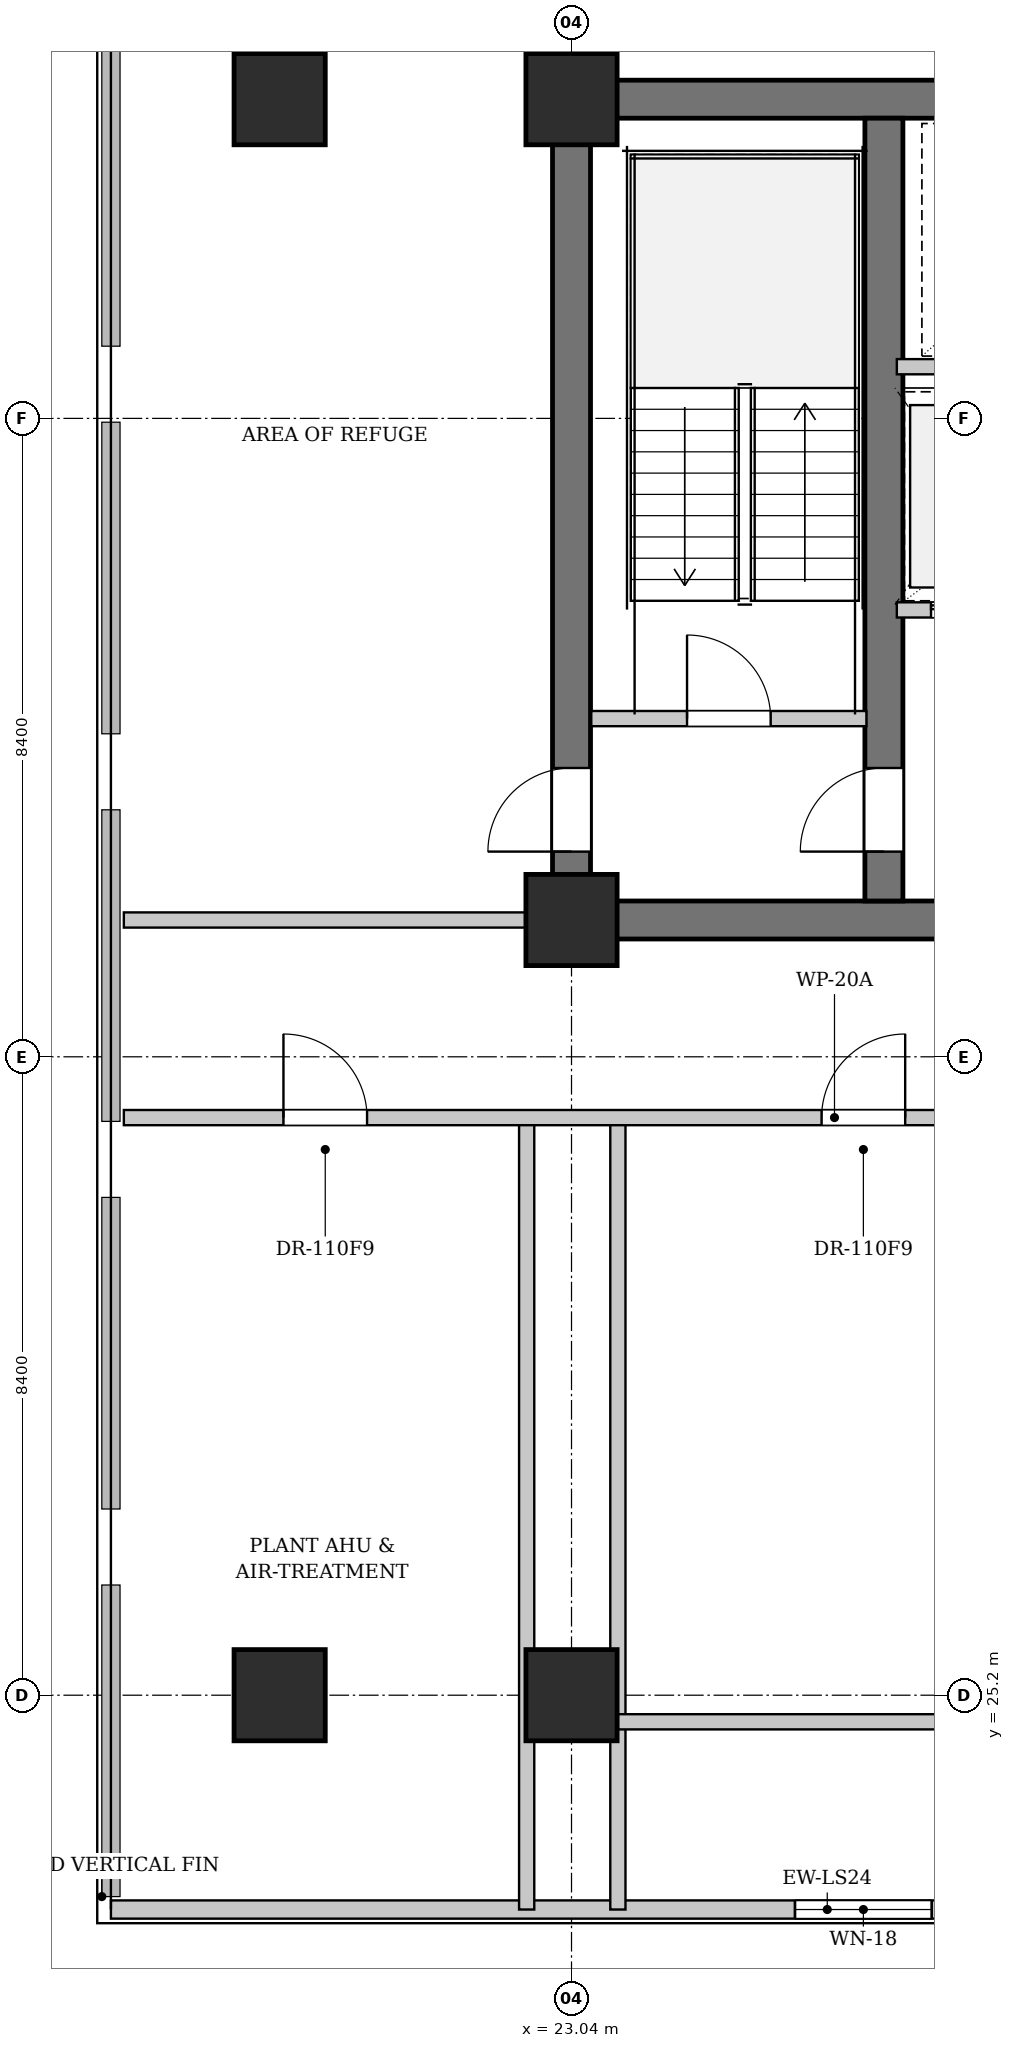
"""IFC4 building model, lengths in metres.
Left out: names, types, materials, properties, quantities, classifications, styles, units other than length and angle.
Written with IfcOpenShell. Run it as: python <this file> out.ifc"""

import sys

from ifc_helpers import new_model, si_unit, direction, frame, frame_2d, origin, origin_2d, place, context, subcontext, project, spatial, rectangle, extrude, element, fill, save


model = new_model("IFC4")
c1 = context("Model", 3, precision=1e-05, world=origin(), true_north=direction((0.0, 1.0)))
c2 = subcontext(c1, "Body", "Model", "MODEL_VIEW")
j1 = project(units=[si_unit("LENGTHUNIT", "METRE"), si_unit("PLANEANGLEUNIT", "RADIAN")], contexts=[c1])
p1 = place(None, origin())
s1 = spatial("IfcSite", under=j1, at=p1, CompositionType="ELEMENT")
p2 = place(p1, origin())
s2 = spatial("IfcBuilding", under=s1, at=p2, CompositionType="ELEMENT")
p3 = place(p2, frame((0.0, 0.0, 78.0)))
s3 = spatial("IfcBuildingStorey", under=s2, at=p3, CompositionType="ELEMENT", Elevation=78.0)
p4 = place(p3, frame((22.79, 46.2, 0.0), z_axis=(0.0, 0.0, 1.0), x_axis=(1.0, 0.0, 0.0)))
e1 = element("IfcWall", 1, at=p4, inside=s3, PredefinedType="SHEAR", context=c2, shape_type="SweptSolid", body=[
    extrude(rectangle(XDim=31.22, YDim=0.5, at=frame_2d((15.61, 0.0))), origin(), (0.0, 0.0, 1.0), 3.68),
])
p5 = place(p3, frame((22.79, 35.4, 0.0), z_axis=(0.0, 0.0, 1.0), x_axis=(1.0, 0.0, 0.0)))
e2 = element("IfcWall", 2, at=p5, inside=s3, PredefinedType="SHEAR", context=c2, shape_type="SweptSolid", body=[
    extrude(rectangle(XDim=5.41, YDim=0.5, at=frame_2d((2.705, 0.0))), origin(), (0.0, 0.0, 1.0), 3.68),
])
p6 = place(p3, frame((23.04, 35.65, 0.0), z_axis=(0.0, 0.0, 1.0), x_axis=(0.0, 1.0, 0.0)))
e3 = element("IfcWall", 3, at=p6, inside=s3, PredefinedType="SHEAR", context=c2, shape_type="SweptSolid", body=[
    extrude(rectangle(XDim=10.3, YDim=0.5, at=frame_2d((5.15, 0.0))), origin(), (0.0, 0.0, 1.0), 3.68),
])
p7 = place(p6, frame((0.65, 0.0, 0.0)))
e4 = element("IfcOpeningElement", 4, at=p7, cuts=e3, PredefinedType="OPENING", context=c2, shape_type="SweptSolid", body=[
    extrude(rectangle(XDim=1.1, YDim=2.15, at=frame_2d((0.55, 1.075))), frame((0.0, 0.26, 0.0), z_axis=(0.0, -1.0, 0.0), x_axis=(1.0, 0.0, 0.0)), (0.0, 0.0, 1.0), 0.52),
])
p8 = place(p3, frame((27.15, 35.65, 0.0), z_axis=(0.0, 0.0, 1.0), x_axis=(0.0, 1.0, 0.0)))
e5 = element("IfcWall", 5, at=p8, inside=s3, PredefinedType="SHEAR", context=c2, shape_type="SweptSolid", body=[
    extrude(rectangle(XDim=10.3, YDim=0.5, at=frame_2d((5.15, 0.0))), origin(), (0.0, 0.0, 1.0), 3.68),
])
p9 = place(p8, frame((0.65, 0.0, 0.0)))
e6 = element("IfcOpeningElement", 6, at=p9, cuts=e5, PredefinedType="OPENING", context=c2, shape_type="SweptSolid", body=[
    extrude(rectangle(XDim=1.1, YDim=2.15, at=frame_2d((0.55, 1.075))), frame((0.0, 0.26, 0.0), z_axis=(0.0, -1.0, 0.0), x_axis=(1.0, 0.0, 0.0)), (0.0, 0.0, 1.0), 0.52),
])
for number, where, z_axis, x_axis in (
    (7, (23.04, 35.4, 0.0), (0.0, 0.0, 1.0), (1.0, 0.0, 0.0)),
    (8, (23.04, 46.2, 0.0), (0.0, 0.0, 1.0), (1.0, 0.0, 0.0)),
    (9, (23.04, 25.2, 0.0), (0.0, 0.0, 1.0), (1.0, 0.0, 0.0)),
    (10, (19.2, 25.2, 0.0), (0.0, 0.0, 1.0), (1.0, 0.0, 0.0)),
    (11, (19.2, 46.2, 0.0), (0.0, 0.0, 1.0), (1.0, 0.0, 0.0)),
):
    element("IfcColumn", number, at=place(p3, frame(where, z_axis=z_axis, x_axis=x_axis)), inside=s3, PredefinedType="COLUMN", context=c2, shape_type="SweptSolid", body=[
        extrude(rectangle(XDim=1.2, YDim=1.2, at=origin_2d()), origin(), (0.0, 0.0, 1.0), 3.9),
    ])
p10 = place(p3, frame((16.98, 22.38, 0.0), z_axis=(0.0, 0.0, 1.0), x_axis=(1.0, 0.0, 0.0)))
e12 = element("IfcWall", 12, at=p10, inside=s3, PredefinedType="SOLIDWALL", context=c2, shape_type="SweptSolid", body=[
    extrude(rectangle(XDim=42.84, YDim=0.24, at=frame_2d((21.42, 0.0))), origin(), (0.0, 0.0, 1.0), 3.68),
])
p11 = place(p10, frame((16.78, 0.0, 0.0)))
e13 = element("IfcOpeningElement", 13, at=p11, cuts=e12, PredefinedType="OPENING", context=c2, shape_type="SweptSolid", body=[
    extrude(rectangle(XDim=1.6, YDim=2.25, at=frame_2d((0.8, 1.125))), frame((0.0, 0.13, 0.0), z_axis=(0.0, -1.0, 0.0), x_axis=(1.0, 0.0, 0.0)), (0.0, 0.0, 1.0), 0.26),
])
p12 = place(p10, frame((9.0, 0.0, 0.9)))
e14 = element("IfcOpeningElement", 14, at=p12, cuts=e12, PredefinedType="OPENING", context=c2, shape_type="SweptSolid", body=[
    extrude(rectangle(XDim=1.8, YDim=2.0, at=frame_2d((0.9, 1.0))), frame((0.0, 0.13, 0.0), z_axis=(0.0, -1.0, 0.0), x_axis=(1.0, 0.0, 0.0)), (0.0, 0.0, 1.0), 0.26),
])
p13 = place(p10, frame((32.04, 0.0, 0.9)))
e15 = element("IfcOpeningElement", 15, at=p13, cuts=e12, PredefinedType="OPENING", context=c2, shape_type="SweptSolid", body=[
    extrude(rectangle(XDim=1.8, YDim=2.0, at=frame_2d((0.9, 1.0))), frame((0.0, 0.13, 0.0), z_axis=(0.0, -1.0, 0.0), x_axis=(1.0, 0.0, 0.0)), (0.0, 0.0, 1.0), 0.26),
])
p14 = place(p3, frame((23.3, 38.05, 0.0), z_axis=(0.0, 0.0, 1.0), x_axis=(1.0, 0.0, 0.0)))
e16 = element("IfcWall", 16, at=p14, inside=s3, PredefinedType="PARTITIONING", context=c2, shape_type="SweptSolid", body=[
    extrude(rectangle(XDim=3.62, YDim=0.2, at=frame_2d((1.81, 0.0))), origin(), (0.0, 0.0, 1.0), 3.68),
])
p15 = place(p14, frame((1.26, 0.0, 0.0)))
e17 = element("IfcOpeningElement", 17, at=p15, cuts=e16, PredefinedType="OPENING", context=c2, shape_type="SweptSolid", body=[
    extrude(rectangle(XDim=1.1, YDim=2.15, at=frame_2d((0.55, 1.075))), frame((0.0, 0.11, 0.0), z_axis=(0.0, -1.0, 0.0), x_axis=(1.0, 0.0, 0.0)), (0.0, 0.0, 1.0), 0.22),
])
p16 = place(p3, frame((27.32, 39.48, 0.0), z_axis=(0.0, 0.0, 1.0), x_axis=(1.0, 0.0, 0.0)))
e18 = element("IfcWall", 18, at=p16, inside=s3, PredefinedType="PARTITIONING", context=c2, shape_type="SweptSolid", body=[
    extrude(rectangle(XDim=3.94, YDim=0.2, at=frame_2d((1.97, 0.0))), origin(), (0.0, 0.0, 1.0), 3.68),
])
p17 = place(p16, frame((0.45, 0.0, 0.0)))
e19 = element("IfcOpeningElement", 19, at=p17, cuts=e18, PredefinedType="OPENING", context=c2, shape_type="SweptSolid", body=[
    extrude(rectangle(XDim=1.1, YDim=2.2, at=frame_2d((0.55, 1.1))), frame((0.0, 0.11, 0.0), z_axis=(0.0, -1.0, 0.0), x_axis=(1.0, 0.0, 0.0)), (0.0, 0.0, 1.0), 0.22),
])
p18 = place(p16, frame((2.41, 0.0, 0.0)))
e20 = element("IfcOpeningElement", 20, at=p18, cuts=e18, PredefinedType="OPENING", context=c2, shape_type="SweptSolid", body=[
    extrude(rectangle(XDim=1.1, YDim=2.2, at=frame_2d((0.55, 1.1))), frame((0.0, 0.11, 0.0), z_axis=(0.0, -1.0, 0.0), x_axis=(1.0, 0.0, 0.0)), (0.0, 0.0, 1.0), 0.22),
])
p19 = place(p3, frame((27.32, 42.68, 0.0), z_axis=(0.0, 0.0, 1.0), x_axis=(1.0, 0.0, 0.0)))
e21 = element("IfcWall", 21, at=p19, inside=s3, PredefinedType="PARTITIONING", context=c2, shape_type="SweptSolid", body=[
    extrude(rectangle(XDim=5.33, YDim=0.2, at=frame_2d((2.665, 0.0))), origin(), (0.0, 0.0, 1.0), 3.68),
])
p20 = place(p19, frame((4.18, 0.0, 0.0)))
e22 = element("IfcOpeningElement", 22, at=p20, cuts=e21, PredefinedType="OPENING", context=c2, shape_type="SweptSolid", body=[
    extrude(rectangle(XDim=0.9, YDim=2.15, at=frame_2d((0.45, 1.075))), frame((0.0, 0.11, 0.0), z_axis=(0.0, -1.0, 0.0), x_axis=(1.0, 0.0, 0.0)), (0.0, 0.0, 1.0), 0.22),
])
p21 = place(p3, frame((17.15, 35.4, 0.0), z_axis=(0.0, 0.0, 1.0), x_axis=(1.0, 0.0, 0.0)))
e23 = element("IfcWall", 23, at=p21, inside=s3, PredefinedType="PARTITIONING", context=c2, shape_type="SweptSolid", body=[
    extrude(rectangle(XDim=5.6, YDim=0.2, at=frame_2d((2.8, 0.0))), origin(), (0.0, 0.0, 1.0), 3.68),
])
for number, where, z_axis, x_axis in (
    (24, (22.45, 22.38, 0.0), (0.0, 0.0, 1.0), (0.0, 1.0, 0.0)),
    (25, (23.65, 22.38, 0.0), (0.0, 0.0, 1.0), (0.0, 1.0, 0.0)),
):
    element("IfcWall", number, at=place(p3, frame(where, z_axis=z_axis, x_axis=x_axis)), inside=s3, PredefinedType="PARTITIONING", context=c2, shape_type="SweptSolid", body=[
        extrude(rectangle(XDim=10.42, YDim=0.2, at=frame_2d((5.21, 0.0))), origin(), (0.0, 0.0, 1.0), 3.68),
    ])
p22 = place(p3, frame((23.65, 24.85, 0.0), z_axis=(0.0, 0.0, 1.0), x_axis=(1.0, 0.0, 0.0)))
e26 = element("IfcWall", 26, at=p22, inside=s3, PredefinedType="PARTITIONING", context=c2, shape_type="SweptSolid", body=[
    extrude(rectangle(XDim=29.5, YDim=0.2, at=frame_2d((14.75, 0.0))), origin(), (0.0, 0.0, 1.0), 3.68),
])
p23 = place(p22, frame((9.7, 0.0, 0.0)))
e27 = element("IfcOpeningElement", 27, at=p23, cuts=e26, PredefinedType="OPENING", context=c2, shape_type="SweptSolid", body=[
    extrude(rectangle(XDim=1.1, YDim=2.15, at=frame_2d((0.55, 1.075))), frame((0.0, 0.11, 0.0), z_axis=(0.0, -1.0, 0.0), x_axis=(1.0, 0.0, 0.0)), (0.0, 0.0, 1.0), 0.22),
])
p24 = place(p3, frame((17.15, 32.8, 0.0), z_axis=(0.0, 0.0, 1.0), x_axis=(1.0, 0.0, 0.0)))
e28 = element("IfcWall", 28, at=p24, inside=s3, PredefinedType="PARTITIONING", context=c2, shape_type="SweptSolid", body=[
    extrude(rectangle(XDim=42.5, YDim=0.2, at=frame_2d((21.25, 0.0))), origin(), (0.0, 0.0, 1.0), 3.68),
])
p25 = place(p24, frame((2.1, 0.0, 0.0)))
e29 = element("IfcOpeningElement", 29, at=p25, cuts=e28, PredefinedType="OPENING", context=c2, shape_type="SweptSolid", body=[
    extrude(rectangle(XDim=1.1, YDim=2.15, at=frame_2d((0.55, 1.075))), frame((0.0, 0.11, 0.0), z_axis=(0.0, -1.0, 0.0), x_axis=(1.0, 0.0, 0.0)), (0.0, 0.0, 1.0), 0.22),
])
p26 = place(p24, frame((9.18, 0.0, 0.0)))
e30 = element("IfcOpeningElement", 30, at=p26, cuts=e28, PredefinedType="OPENING", context=c2, shape_type="SweptSolid", body=[
    extrude(rectangle(XDim=1.1, YDim=2.15, at=frame_2d((0.55, 1.075))), frame((0.0, 0.11, 0.0), z_axis=(0.0, -1.0, 0.0), x_axis=(1.0, 0.0, 0.0)), (0.0, 0.0, 1.0), 0.22),
])
p27 = place(p24, frame((16.2, 0.0, 0.0)))
e31 = element("IfcOpeningElement", 31, at=p27, cuts=e28, PredefinedType="OPENING", context=c2, shape_type="SweptSolid", body=[
    extrude(rectangle(XDim=1.1, YDim=2.15, at=frame_2d((0.55, 1.075))), frame((0.0, 0.11, 0.0), z_axis=(0.0, -1.0, 0.0), x_axis=(1.0, 0.0, 0.0)), (0.0, 0.0, 1.0), 0.22),
])
p28 = place(p24, frame((24.54, 0.0, 0.0)))
e32 = element("IfcOpeningElement", 32, at=p28, cuts=e28, PredefinedType="OPENING", context=c2, shape_type="SweptSolid", body=[
    extrude(rectangle(XDim=1.1, YDim=2.15, at=frame_2d((0.55, 1.075))), frame((0.0, 0.11, 0.0), z_axis=(0.0, -1.0, 0.0), x_axis=(1.0, 0.0, 0.0)), (0.0, 0.0, 1.0), 0.22),
])
p29 = place(p24, frame((39.3, 0.0, 0.0)))
e33 = element("IfcOpeningElement", 33, at=p29, cuts=e28, PredefinedType="OPENING", context=c2, shape_type="SweptSolid", body=[
    extrude(rectangle(XDim=1.1, YDim=2.15, at=frame_2d((0.55, 1.075))), frame((0.0, 0.11, 0.0), z_axis=(0.0, -1.0, 0.0), x_axis=(1.0, 0.0, 0.0)), (0.0, 0.0, 1.0), 0.22),
])
p30 = place(p12, origin())
e34 = element("IfcWindow", 34, at=p30, inside=s3, PartitioningType="SINGLE_PANEL", PredefinedType="WINDOW", context=c2, shape_type="SweptSolid", body=[
    extrude(rectangle(XDim=1.8, YDim=2.0, at=frame_2d((0.9, 1.0))), frame((0.0, 0.03, 0.0), z_axis=(0.0, -1.0, 0.0), x_axis=(1.0, 0.0, 0.0)), (0.0, 0.0, 1.0), 0.06),
])
fill(e14, e34)
p31 = place(p15, origin())
e35 = element("IfcDoor", 35, at=p31, inside=s3, OperationType="SINGLE_SWING_LEFT", PredefinedType="DOOR", context=c2, shape_type="SweptSolid", body=[
    extrude(rectangle(XDim=1.1, YDim=2.15, at=frame_2d((0.55, 1.075))), frame((0.0, 0.025, 0.0), z_axis=(0.0, -1.0, 0.0), x_axis=(1.0, 0.0, 0.0)), (0.0, 0.0, 1.0), 0.05),
])
fill(e17, e35)
p32 = place(p17, origin())
e36 = element("IfcDoor", 36, at=p32, inside=s3, OperationType="DOUBLE_DOOR_SLIDING", PredefinedType="DOOR", context=c2, shape_type="SweptSolid", body=[
    extrude(rectangle(XDim=1.1, YDim=2.2, at=frame_2d((0.55, 1.1))), frame((0.0, 0.025, 0.0), z_axis=(0.0, -1.0, 0.0), x_axis=(1.0, 0.0, 0.0)), (0.0, 0.0, 1.0), 0.05),
])
fill(e19, e36)
p33 = place(p25, origin())
e37 = element("IfcDoor", 37, at=p33, inside=s3, OperationType="SINGLE_SWING_LEFT", PredefinedType="DOOR", context=c2, shape_type="SweptSolid", body=[
    extrude(rectangle(XDim=1.1, YDim=2.15, at=frame_2d((0.55, 1.075))), frame((0.0, 0.025, 0.0), z_axis=(0.0, -1.0, 0.0), x_axis=(1.0, 0.0, 0.0)), (0.0, 0.0, 1.0), 0.05),
])
fill(e29, e37)
p34 = place(p26, origin())
e38 = element("IfcDoor", 38, at=p34, inside=s3, OperationType="SINGLE_SWING_RIGHT", PredefinedType="DOOR", context=c2, shape_type="SweptSolid", body=[
    extrude(rectangle(XDim=1.1, YDim=2.15, at=frame_2d((0.55, 1.075))), frame((0.0, 0.025, 0.0), z_axis=(0.0, -1.0, 0.0), x_axis=(1.0, 0.0, 0.0)), (0.0, 0.0, 1.0), 0.05),
])
fill(e30, e38)
p35 = place(p9, origin())
e39 = element("IfcDoor", 39, at=p35, inside=s3, OperationType="SINGLE_SWING_LEFT", PredefinedType="DOOR", context=c2, shape_type="SweptSolid", body=[
    extrude(rectangle(XDim=1.1, YDim=2.15, at=frame_2d((0.55, 1.075))), frame((0.0, 0.025, 0.0), z_axis=(0.0, -1.0, 0.0), x_axis=(1.0, 0.0, 0.0)), (0.0, 0.0, 1.0), 0.05),
])
fill(e6, e39)
p36 = place(p7, origin())
e40 = element("IfcDoor", 40, at=p36, inside=s3, OperationType="SINGLE_SWING_LEFT", PredefinedType="DOOR", context=c2, shape_type="SweptSolid", body=[
    extrude(rectangle(XDim=1.1, YDim=2.15, at=frame_2d((0.55, 1.075))), frame((0.0, 0.025, 0.0), z_axis=(0.0, -1.0, 0.0), x_axis=(1.0, 0.0, 0.0)), (0.0, 0.0, 1.0), 0.05),
])
fill(e4, e40)
save(model, sys.argv[1])
